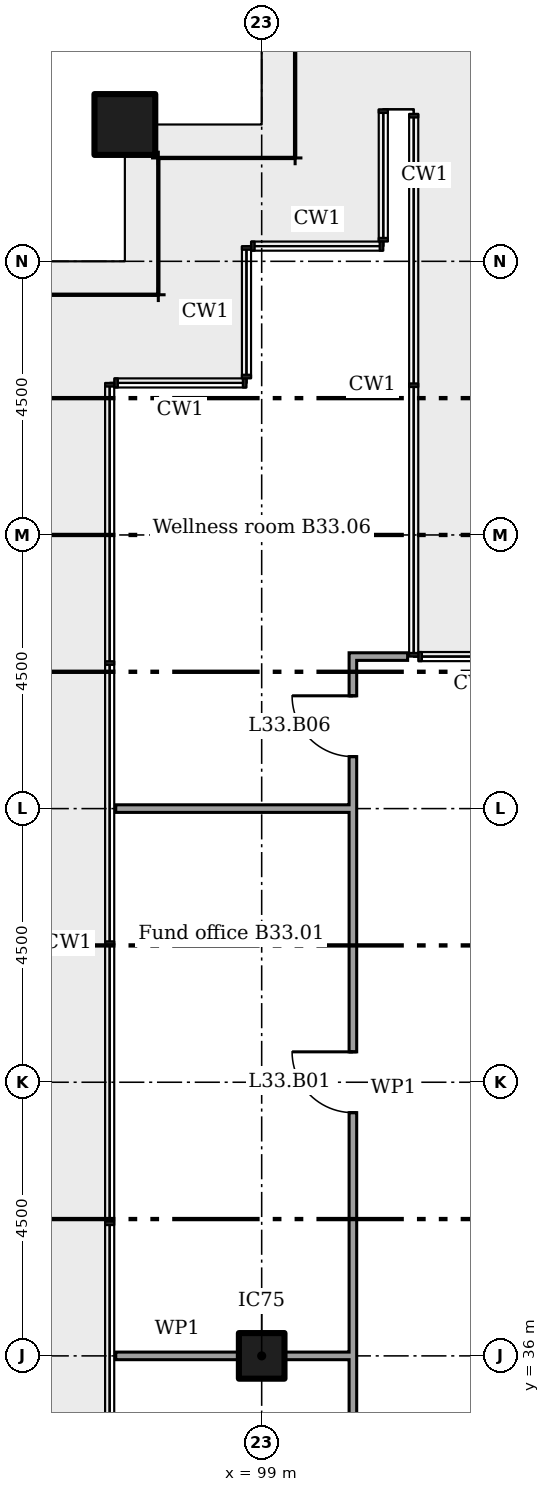
"""IFC4 building model, lengths in metres.
Left out: names, types, materials, properties, quantities, classifications, styles, units other than length and angle.
Written with IfcOpenShell. Run it as: python <this file> out.ifc"""

import sys

from ifc_helpers import new_model, si_unit, direction, frame, frame_2d, origin, origin_2d, place, context, subcontext, project, spatial, rectangle, extrude, element, fill, save


model = new_model("IFC4")
c1 = context("Model", 3, precision=1e-05, world=origin(), true_north=direction((0.0, 1.0)))
c2 = subcontext(c1, "Body", "Model", "MODEL_VIEW")
j1 = project(units=[si_unit("LENGTHUNIT", "METRE"), si_unit("PLANEANGLEUNIT", "RADIAN")], contexts=[c1])
p1 = place(None, origin())
s1 = spatial("IfcSite", under=j1, at=p1, CompositionType="ELEMENT")
p2 = place(p1, origin())
s2 = spatial("IfcBuilding", under=s1, at=p2, CompositionType="ELEMENT")
p3 = place(p2, frame((0.0, 0.0, 135.2)))
s3 = spatial("IfcBuildingStorey", under=s2, at=p3, CompositionType="ELEMENT", Elevation=135.2)
p4 = place(p3, frame((96.75, 56.25, 0.0)))
e1 = element("IfcColumn", 1, at=p4, inside=s3, PredefinedType="COLUMN", context=c2, shape_type="SweptSolid", body=[
    extrude(rectangle(XDim=1.0, YDim=1.0, at=origin_2d()), origin(), (0.0, 0.0, 1.0), 3.6),
])
p5 = place(p3, frame((99.0, 36.0, 0.0)))
e2 = element("IfcColumn", 2, at=p5, inside=s3, PredefinedType="COLUMN", context=c2, shape_type="SweptSolid", body=[
    extrude(rectangle(XDim=0.75, YDim=0.75, at=origin_2d()), origin(), (0.0, 0.0, 1.0), 3.6),
])
p6 = place(p3, frame((96.6, 36.0, 0.0)))
e3 = element("IfcWall", 3, at=p6, inside=s3, PredefinedType="PARTITIONING", context=c2, shape_type="SweptSolid", body=[
    extrude(rectangle(XDim=2.025, YDim=0.125, at=frame_2d((1.012, 0.0))), origin(), (0.0, 0.0, 1.0), 2.708),
])
p7 = place(p3, frame((99.375, 36.0, 0.0)))
e4 = element("IfcWall", 4, at=p7, inside=s3, PredefinedType="PARTITIONING", context=c2, shape_type="SweptSolid", body=[
    extrude(rectangle(XDim=1.125, YDim=0.125, at=frame_2d((0.562, 0.0))), origin(), (0.0, 0.0, 1.0), 2.708),
])
p8 = place(p3, frame((96.6, 45.0, 0.0)))
e5 = element("IfcWall", 5, at=p8, inside=s3, PredefinedType="PARTITIONING", context=c2, shape_type="SweptSolid", body=[
    extrude(rectangle(XDim=3.9, YDim=0.125, at=frame_2d((1.95, 0.0))), origin(), (0.0, 0.0, 1.0), 2.712),
])
p9 = place(p3, frame((100.438, 47.5, 0.0)))
e6 = element("IfcWall", 6, at=p9, inside=s3, PredefinedType="PARTITIONING", context=c2, shape_type="SweptSolid", body=[
    extrude(rectangle(XDim=0.962, YDim=0.125, at=frame_2d((0.481, 0.0))), origin(), (0.0, 0.0, 1.0), 3.4),
])
p10 = place(p3, frame((100.5, 33.363, 0.0), z_axis=(0.0, 0.0, 1.0), x_axis=(0.0, 1.0, 0.0)))
e7 = element("IfcWall", 7, at=p10, inside=s3, PredefinedType="PARTITIONING", context=c2, shape_type="SweptSolid", body=[
    extrude(rectangle(XDim=14.075, YDim=0.125, at=frame_2d((7.038, 0.0))), origin(), (0.0, 0.0, 1.0), 3.4),
])
p11 = place(p10, frame((6.637, 0.0, 0.0)))
e8 = element("IfcOpeningElement", 8, at=p11, cuts=e7, PredefinedType="OPENING", context=c2, shape_type="SweptSolid", body=[
    extrude(rectangle(XDim=1.0, YDim=2.1, at=frame_2d((0.5, 1.05))), frame((0.0, 0.073, 0.0), z_axis=(0.0, -1.0, 0.0), x_axis=(1.0, 0.0, 0.0)), (0.0, 0.0, 1.0), 0.145),
])
p12 = place(p10, frame((0.647, 0.0, 0.0)))
e9 = element("IfcOpeningElement", 9, at=p12, cuts=e7, PredefinedType="OPENING", context=c2, shape_type="SweptSolid", body=[
    extrude(rectangle(XDim=1.0, YDim=2.1, at=frame_2d((0.5, 1.05))), frame((0.0, 0.073, 0.0), z_axis=(0.0, -1.0, 0.0), x_axis=(1.0, 0.0, 0.0)), (0.0, 0.0, 1.0), 0.145),
])
p13 = place(p10, frame((12.492, 0.0, 0.0)))
e10 = element("IfcOpeningElement", 10, at=p13, cuts=e7, PredefinedType="OPENING", context=c2, shape_type="SweptSolid", body=[
    extrude(rectangle(XDim=1.0, YDim=2.1, at=frame_2d((0.5, 1.05))), frame((0.0, 0.073, 0.0), z_axis=(0.0, -1.0, 0.0), x_axis=(1.0, 0.0, 0.0)), (0.0, 0.0, 1.0), 0.145),
])
p14 = place(p11, origin())
e11 = element("IfcDoor", 11, at=p14, inside=s3, OperationType="SINGLE_SWING_LEFT", PredefinedType="DOOR", context=c2, shape_type="SweptSolid", body=[
    extrude(rectangle(XDim=1.0, YDim=2.1, at=frame_2d((0.5, 1.05))), frame((0.0, 0.025, 0.0), z_axis=(0.0, -1.0, 0.0), x_axis=(1.0, 0.0, 0.0)), (0.0, 0.0, 1.0), 0.05),
])
fill(e8, e11)
p15 = place(p13, origin())
e12 = element("IfcDoor", 12, at=p15, inside=s3, OperationType="SINGLE_SWING_LEFT", PredefinedType="DOOR", context=c2, shape_type="SweptSolid", body=[
    extrude(rectangle(XDim=1.0, YDim=2.1, at=frame_2d((0.5, 1.05))), frame((0.0, 0.025, 0.0), z_axis=(0.0, -1.0, 0.0), x_axis=(1.0, 0.0, 0.0)), (0.0, 0.0, 1.0), 0.05),
])
fill(e10, e12)
save(model, sys.argv[1])
